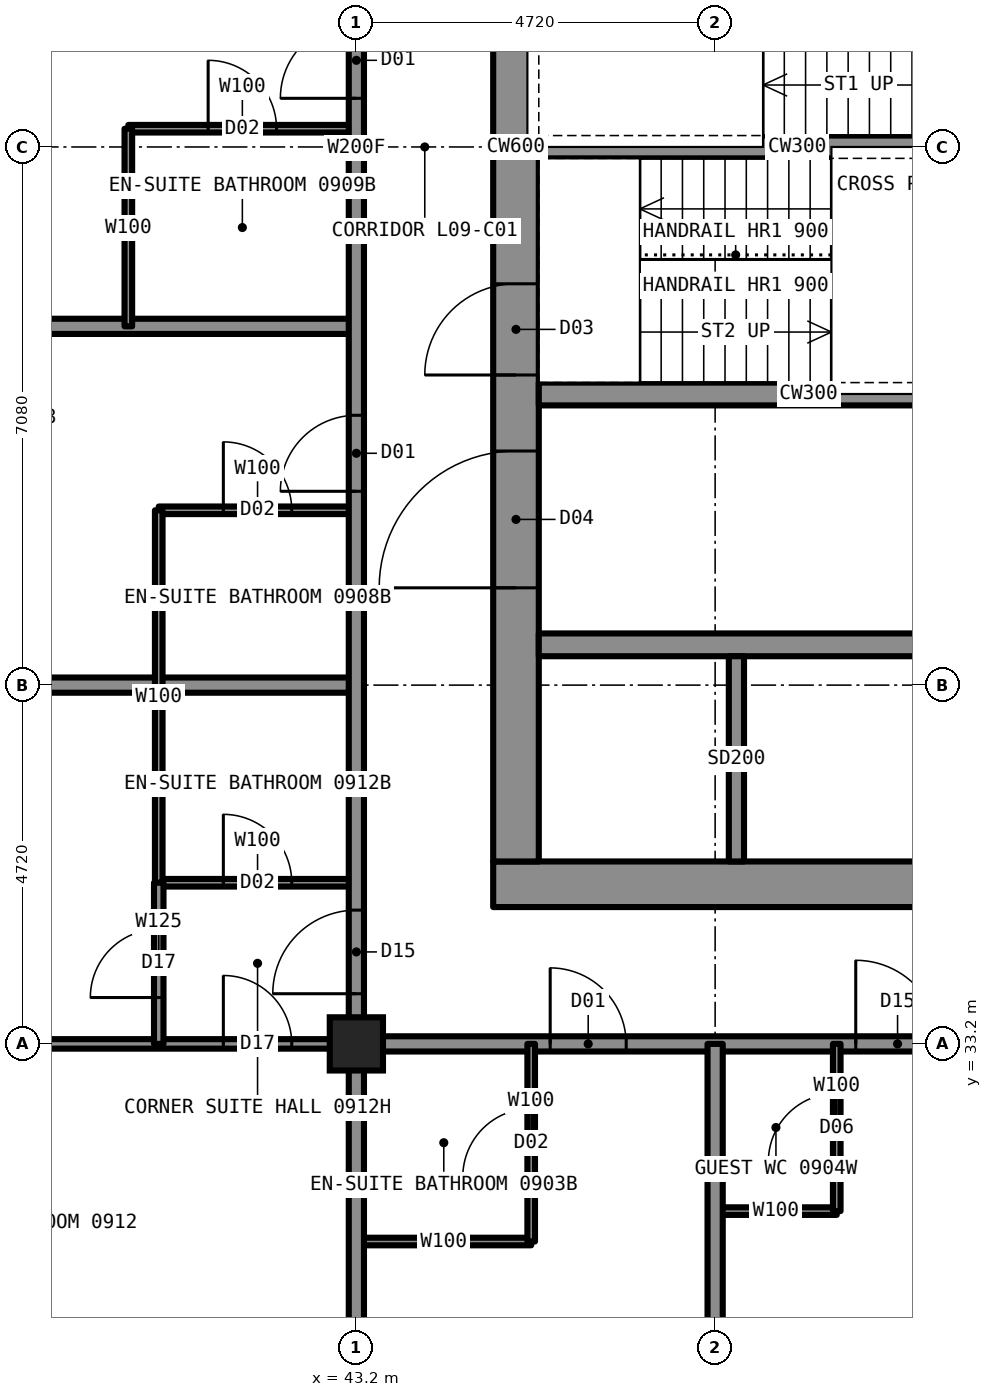
"""IFC4 building model, lengths in metres.
Left out: names, types, materials, properties, quantities, classifications, styles, units other than length and angle.
Written with IfcOpenShell. Run it as: python <this file> out.ifc"""

import sys

from ifc_helpers import new_model, si_unit, direction, frame, frame_2d, origin, origin_2d, place, context, subcontext, project, spatial, rectangle, hollow_rectangle, extrude, element, fill, save


model = new_model("IFC4")
c1 = context("Model", 3, precision=1e-05, world=origin(), true_north=direction((0.0, 1.0)))
c2 = subcontext(c1, "Body", "Model", "MODEL_VIEW")
j1 = project(units=[si_unit("LENGTHUNIT", "METRE"), si_unit("PLANEANGLEUNIT", "RADIAN")], contexts=[c1])
p1 = place(None, origin())
s1 = spatial("IfcSite", under=j1, at=p1, CompositionType="ELEMENT")
p2 = place(p1, origin())
s2 = spatial("IfcBuilding", under=s1, at=p2, CompositionType="ELEMENT")
p3 = place(p2, frame((0.0, 0.0, 39.0)))
s3 = spatial("IfcBuildingStorey", under=s2, at=p3, CompositionType="ELEMENT", Elevation=39.0)
p4 = place(p3, frame((43.2, 33.2, 0.0), z_axis=(0.0, 0.0, 1.0), x_axis=(1.0, 0.0, 0.0)))
e1 = element("IfcColumn", 1, at=p4, inside=s3, PredefinedType="COLUMN", context=c2, shape_type="SweptSolid", body=[
    extrude(hollow_rectangle(XDim=0.7, YDim=0.7, WallThickness=0.06, at=origin_2d()), origin(), (0.0, 0.0, 1.0), 3.5),
])
p5 = place(p3, frame((45.0, 35.3, 0.0), z_axis=(0.0, 0.0, 1.0), x_axis=(1.0, 0.0, 0.0)))
e2 = element("IfcWall", 2, at=p5, inside=s3, PredefinedType="SHEAR", context=c2, shape_type="SweptSolid", body=[
    extrude(rectangle(XDim=20.0, YDim=0.6, at=frame_2d((10.0, 0.0))), origin(), (0.0, 0.0, 1.0), 3.5),
])
p6 = place(p3, frame((45.3, 35.6, 0.0), z_axis=(0.0, 0.0, 1.0), x_axis=(0.0, 1.0, 0.0)))
e3 = element("IfcWall", 3, at=p6, inside=s3, PredefinedType="SHEAR", context=c2, shape_type="SweptSolid", body=[
    extrude(rectangle(XDim=18.8, YDim=0.6, at=frame_2d((9.4, 0.0))), origin(), (0.0, 0.0, 1.0), 3.5),
])
p7 = place(p6, frame((13.4, 0.0, 0.0)))
e4 = element("IfcOpeningElement", 4, at=p7, cuts=e3, PredefinedType="OPENING", context=c2, shape_type="SweptSolid", body=[
    extrude(rectangle(XDim=1.8, YDim=2.2, at=frame_2d((0.9, 1.1))), frame((0.0, 0.31, 0.0), z_axis=(0.0, -1.0, 0.0), x_axis=(1.0, 0.0, 0.0)), (0.0, 0.0, 1.0), 0.62),
])
p8 = place(p6, frame((3.6, 0.0, 0.0)))
e5 = element("IfcOpeningElement", 5, at=p8, cuts=e3, PredefinedType="OPENING", context=c2, shape_type="SweptSolid", body=[
    extrude(rectangle(XDim=1.8, YDim=2.2, at=frame_2d((0.9, 1.1))), frame((0.0, 0.31, 0.0), z_axis=(0.0, -1.0, 0.0), x_axis=(1.0, 0.0, 0.0)), (0.0, 0.0, 1.0), 0.62),
])
p9 = place(p6, frame((6.4, 0.0, 0.0)))
e6 = element("IfcOpeningElement", 6, at=p9, cuts=e3, PredefinedType="OPENING", context=c2, shape_type="SweptSolid", body=[
    extrude(rectangle(XDim=1.2, YDim=2.2, at=frame_2d((0.6, 1.1))), frame((0.0, 0.31, 0.0), z_axis=(0.0, -1.0, 0.0), x_axis=(1.0, 0.0, 0.0)), (0.0, 0.0, 1.0), 0.62),
])
p10 = place(p3, frame((45.6, 38.45, 0.0), z_axis=(0.0, 0.0, 1.0), x_axis=(1.0, 0.0, 0.0)))
e7 = element("IfcWall", 7, at=p10, inside=s3, PredefinedType="SHEAR", context=c2, shape_type="SweptSolid", body=[
    extrude(rectangle(XDim=18.8, YDim=0.3, at=frame_2d((9.4, 0.0))), origin(), (0.0, 0.0, 1.0), 3.5),
])
p11 = place(p3, frame((45.6, 41.75, 0.0), z_axis=(0.0, 0.0, 1.0), x_axis=(1.0, 0.0, 0.0)))
e8 = element("IfcWall", 8, at=p11, inside=s3, PredefinedType="SHEAR", context=c2, shape_type="SweptSolid", body=[
    extrude(rectangle(XDim=7.1, YDim=0.3, at=frame_2d((3.55, 0.0))), origin(), (0.0, 0.0, 1.0), 3.5),
])
p12 = place(p3, frame((45.6, 45.0, 0.0), z_axis=(0.0, 0.0, 1.0), x_axis=(1.0, 0.0, 0.0)))
e9 = element("IfcWall", 9, at=p12, inside=s3, PredefinedType="SHEAR", context=c2, shape_type="SweptSolid", body=[
    extrude(rectangle(XDim=6.8, YDim=0.3, at=frame_2d((3.4, 0.0))), origin(), (0.0, 0.0, 1.0), 3.5),
])
p13 = place(p3, frame((43.2, 33.2, 0.0), z_axis=(0.0, 0.0, 1.0), x_axis=(1.0, 0.0, 0.0)))
e10 = element("IfcWall", 10, at=p13, inside=s3, PredefinedType="PARTITIONING", context=c2, shape_type="SweptSolid", body=[
    extrude(rectangle(XDim=23.6, YDim=0.2, at=frame_2d((11.8, 0.0))), origin(), (0.0, 0.0, 1.0), 3.33),
])
p14 = place(p13, frame((2.55, 0.0, 0.0)))
e11 = element("IfcOpeningElement", 11, at=p14, cuts=e10, PredefinedType="OPENING", context=c2, shape_type="SweptSolid", body=[
    extrude(rectangle(XDim=1.0, YDim=2.2, at=frame_2d((0.5, 1.1))), frame((0.0, 0.11, 0.0), z_axis=(0.0, -1.0, 0.0), x_axis=(1.0, 0.0, 0.0)), (0.0, 0.0, 1.0), 0.22),
])
p15 = place(p13, frame((6.57, 0.0, 0.0)))
e12 = element("IfcOpeningElement", 12, at=p15, cuts=e10, PredefinedType="OPENING", context=c2, shape_type="SweptSolid", body=[
    extrude(rectangle(XDim=1.1, YDim=2.2, at=frame_2d((0.55, 1.1))), frame((0.0, 0.11, 0.0), z_axis=(0.0, -1.0, 0.0), x_axis=(1.0, 0.0, 0.0)), (0.0, 0.0, 1.0), 0.22),
])
p16 = place(p13, frame((20.34, 0.0, 0.0)))
e13 = element("IfcOpeningElement", 13, at=p16, cuts=e10, PredefinedType="OPENING", context=c2, shape_type="SweptSolid", body=[
    extrude(rectangle(XDim=1.0, YDim=2.2, at=frame_2d((0.5, 1.1))), frame((0.0, 0.11, 0.0), z_axis=(0.0, -1.0, 0.0), x_axis=(1.0, 0.0, 0.0)), (0.0, 0.0, 1.0), 0.22),
])
p17 = place(p3, frame((33.3, 33.2, 0.0), z_axis=(0.0, 0.0, 1.0), x_axis=(1.0, 0.0, 0.0)))
e14 = element("IfcWall", 14, at=p17, inside=s3, PredefinedType="PARTITIONING", context=c2, shape_type="SweptSolid", body=[
    extrude(rectangle(XDim=9.9, YDim=0.125, at=frame_2d((4.95, 0.0))), origin(), (0.0, 0.0, 1.0), 2.573),
])
p18 = place(p17, frame((8.15, 0.0, 0.0)))
e15 = element("IfcOpeningElement", 15, at=p18, cuts=e14, PredefinedType="OPENING", context=c2, shape_type="SweptSolid", body=[
    extrude(rectangle(XDim=0.9, YDim=2.2, at=frame_2d((0.45, 1.1))), frame((0.0, 0.073, 0.0), z_axis=(0.0, -1.0, 0.0), x_axis=(1.0, 0.0, 0.0)), (0.0, 0.0, 1.0), 0.145),
])
p19 = place(p3, frame((47.92, 31.0, 0.0), z_axis=(0.0, 0.0, 1.0), x_axis=(1.0, 0.0, 0.0)))
e16 = element("IfcWall", 16, at=p19, inside=s3, PredefinedType="PARTITIONING", context=c2, shape_type="SweptSolid", body=[
    extrude(rectangle(XDim=1.6, YDim=0.1, at=frame_2d((0.8, 0.0))), origin(), (0.0, 0.0, 1.0), 3.33),
])
p20 = place(p3, frame((43.2, 30.6, 0.0), z_axis=(0.0, 0.0, 1.0), x_axis=(1.0, 0.0, 0.0)))
e17 = element("IfcWall", 17, at=p20, inside=s3, PredefinedType="PARTITIONING", context=c2, shape_type="SweptSolid", body=[
    extrude(rectangle(XDim=2.3, YDim=0.1, at=frame_2d((1.15, 0.0))), origin(), (0.0, 0.0, 1.0), 3.33),
])
p21 = place(p3, frame((33.3, 42.64, 0.0), z_axis=(0.0, 0.0, 1.0), x_axis=(1.0, 0.0, 0.0)))
e18 = element("IfcWall", 18, at=p21, inside=s3, PredefinedType="PARTITIONING", context=c2, shape_type="SweptSolid", body=[
    extrude(rectangle(XDim=9.9, YDim=0.2, at=frame_2d((4.95, 0.0))), origin(), (0.0, 0.0, 1.0), 2.723),
])
p22 = place(p3, frame((40.6, 40.22, 0.0), z_axis=(0.0, 0.0, 1.0), x_axis=(1.0, 0.0, 0.0)))
e19 = element("IfcWall", 19, at=p22, inside=s3, PredefinedType="PARTITIONING", context=c2, shape_type="SweptSolid", body=[
    extrude(rectangle(XDim=2.6, YDim=0.1, at=frame_2d((1.3, 0.0))), origin(), (0.0, 0.0, 1.0), 2.723),
])
p23 = place(p22, frame((0.85, 0.0, 0.0)))
e20 = element("IfcOpeningElement", 20, at=p23, cuts=e19, PredefinedType="OPENING", context=c2, shape_type="SweptSolid", body=[
    extrude(rectangle(XDim=0.9, YDim=2.1, at=frame_2d((0.45, 1.05))), frame((0.0, 0.06, 0.0), z_axis=(0.0, -1.0, 0.0), x_axis=(1.0, 0.0, 0.0)), (0.0, 0.0, 1.0), 0.12),
])
p24 = place(p3, frame((33.3, 37.92, 0.0), z_axis=(0.0, 0.0, 1.0), x_axis=(1.0, 0.0, 0.0)))
e21 = element("IfcWall", 21, at=p24, inside=s3, PredefinedType="PARTITIONING", context=c2, shape_type="SweptSolid", body=[
    extrude(rectangle(XDim=9.9, YDim=0.2, at=frame_2d((4.95, 0.0))), origin(), (0.0, 0.0, 1.0), 2.573),
])
p25 = place(p3, frame((40.6, 35.32, 0.0), z_axis=(0.0, 0.0, 1.0), x_axis=(1.0, 0.0, 0.0)))
e22 = element("IfcWall", 22, at=p25, inside=s3, PredefinedType="PARTITIONING", context=c2, shape_type="SweptSolid", body=[
    extrude(rectangle(XDim=2.6, YDim=0.1, at=frame_2d((1.3, 0.0))), origin(), (0.0, 0.0, 1.0), 3.33),
])
p26 = place(p25, frame((0.85, 0.0, 0.0)))
e23 = element("IfcOpeningElement", 23, at=p26, cuts=e22, PredefinedType="OPENING", context=c2, shape_type="SweptSolid", body=[
    extrude(rectangle(XDim=0.9, YDim=2.1, at=frame_2d((0.45, 1.05))), frame((0.0, 0.06, 0.0), z_axis=(0.0, -1.0, 0.0), x_axis=(1.0, 0.0, 0.0)), (0.0, 0.0, 1.0), 0.12),
])
p27 = place(p3, frame((40.2, 45.24, 0.0), z_axis=(0.0, 0.0, 1.0), x_axis=(1.0, 0.0, 0.0)))
e24 = element("IfcWall", 24, at=p27, inside=s3, PredefinedType="PARTITIONING", context=c2, shape_type="SweptSolid", body=[
    extrude(rectangle(XDim=3.0, YDim=0.1, at=frame_2d((1.5, 0.0))), origin(), (0.0, 0.0, 1.0), 3.33),
])
p28 = place(p27, frame((1.05, 0.0, 0.0)))
e25 = element("IfcOpeningElement", 25, at=p28, cuts=e24, PredefinedType="OPENING", context=c2, shape_type="SweptSolid", body=[
    extrude(rectangle(XDim=0.9, YDim=2.1, at=frame_2d((0.45, 1.05))), frame((0.0, 0.06, 0.0), z_axis=(0.0, -1.0, 0.0), x_axis=(1.0, 0.0, 0.0)), (0.0, 0.0, 1.0), 0.12),
])
p29 = place(p3, frame((43.2, 33.2, 0.0), z_axis=(0.0, 0.0, 1.0), x_axis=(0.0, 1.0, 0.0)))
e26 = element("IfcWall", 26, at=p29, inside=s3, PredefinedType="PARTITIONING", context=c2, shape_type="SweptSolid", body=[
    extrude(rectangle(XDim=23.58, YDim=0.2, at=frame_2d((11.79, 0.0))), origin(), (0.0, 0.0, 1.0), 3.33),
])
p30 = place(p29, frame((7.27, 0.0, 0.0)))
e27 = element("IfcOpeningElement", 27, at=p30, cuts=e26, PredefinedType="OPENING", context=c2, shape_type="SweptSolid", body=[
    extrude(rectangle(XDim=1.0, YDim=2.2, at=frame_2d((0.5, 1.1))), frame((0.0, 0.11, 0.0), z_axis=(0.0, -1.0, 0.0), x_axis=(1.0, 0.0, 0.0)), (0.0, 0.0, 1.0), 0.22),
])
p31 = place(p29, frame((12.44, 0.0, 0.0)))
e28 = element("IfcOpeningElement", 28, at=p31, cuts=e26, PredefinedType="OPENING", context=c2, shape_type="SweptSolid", body=[
    extrude(rectangle(XDim=1.0, YDim=2.2, at=frame_2d((0.5, 1.1))), frame((0.0, 0.11, 0.0), z_axis=(0.0, -1.0, 0.0), x_axis=(1.0, 0.0, 0.0)), (0.0, 0.0, 1.0), 0.22),
])
p32 = place(p29, frame((21.84, 0.0, 0.0)))
e29 = element("IfcOpeningElement", 29, at=p32, cuts=e26, PredefinedType="OPENING", context=c2, shape_type="SweptSolid", body=[
    extrude(rectangle(XDim=1.1, YDim=2.2, at=frame_2d((0.55, 1.1))), frame((0.0, 0.11, 0.0), z_axis=(0.0, -1.0, 0.0), x_axis=(1.0, 0.0, 0.0)), (0.0, 0.0, 1.0), 0.22),
])
p33 = place(p29, frame((0.66, 0.0, 0.0)))
e30 = element("IfcOpeningElement", 30, at=p33, cuts=e26, PredefinedType="OPENING", context=c2, shape_type="SweptSolid", body=[
    extrude(rectangle(XDim=1.1, YDim=2.2, at=frame_2d((0.55, 1.1))), frame((0.0, 0.11, 0.0), z_axis=(0.0, -1.0, 0.0), x_axis=(1.0, 0.0, 0.0)), (0.0, 0.0, 1.0), 0.22),
])
p34 = place(p3, frame((43.2, 23.3, 0.0), z_axis=(0.0, 0.0, 1.0), x_axis=(0.0, 1.0, 0.0)))
e31 = element("IfcWall", 31, at=p34, inside=s3, PredefinedType="PARTITIONING", context=c2, shape_type="SweptSolid", body=[
    extrude(rectangle(XDim=9.9, YDim=0.2, at=frame_2d((4.95, 0.0))), origin(), (0.0, 0.0, 1.0), 2.573),
])
p35 = place(p3, frame((40.6, 35.32, 0.0), z_axis=(0.0, 0.0, 1.0), x_axis=(0.0, 1.0, 0.0)))
e32 = element("IfcWall", 32, at=p35, inside=s3, PredefinedType="PARTITIONING", context=c2, shape_type="SweptSolid", body=[
    extrude(rectangle(XDim=4.9, YDim=0.1, at=frame_2d((2.45, 0.0))), origin(), (0.0, 0.0, 1.0), 3.33),
])
p36 = place(p3, frame((40.6, 33.2, 0.0), z_axis=(0.0, 0.0, 1.0), x_axis=(0.0, 1.0, 0.0)))
e33 = element("IfcWall", 33, at=p36, inside=s3, PredefinedType="PARTITIONING", context=c2, shape_type="SweptSolid", body=[
    extrude(rectangle(XDim=2.12, YDim=0.125, at=frame_2d((1.06, 0.0))), origin(), (0.0, 0.0, 1.0), 3.33),
])
p37 = place(p36, frame((0.61, 0.0, 0.0)))
e34 = element("IfcOpeningElement", 34, at=p37, cuts=e33, PredefinedType="OPENING", context=c2, shape_type="SweptSolid", body=[
    extrude(rectangle(XDim=0.9, YDim=2.2, at=frame_2d((0.45, 1.1))), frame((0.0, 0.073, 0.0), z_axis=(0.0, -1.0, 0.0), x_axis=(1.0, 0.0, 0.0)), (0.0, 0.0, 1.0), 0.145),
])
p38 = place(p3, frame((40.2, 42.64, 0.0), z_axis=(0.0, 0.0, 1.0), x_axis=(0.0, 1.0, 0.0)))
e35 = element("IfcWall", 35, at=p38, inside=s3, PredefinedType="PARTITIONING", context=c2, shape_type="SweptSolid", body=[
    extrude(rectangle(XDim=2.6, YDim=0.1, at=frame_2d((1.3, 0.0))), origin(), (0.0, 0.0, 1.0), 3.33),
])
p39 = place(p3, frame((49.52, 31.0, 0.0), z_axis=(0.0, 0.0, 1.0), x_axis=(0.0, 1.0, 0.0)))
e36 = element("IfcWall", 36, at=p39, inside=s3, PredefinedType="PARTITIONING", context=c2, shape_type="SweptSolid", body=[
    extrude(rectangle(XDim=2.2, YDim=0.1, at=frame_2d((1.1, 0.0))), origin(), (0.0, 0.0, 1.0), 3.33),
])
p40 = place(p39, frame((0.65, 0.0, 0.0)))
e37 = element("IfcOpeningElement", 37, at=p40, cuts=e36, PredefinedType="OPENING", context=c2, shape_type="SweptSolid", body=[
    extrude(rectangle(XDim=0.9, YDim=2.1, at=frame_2d((0.45, 1.05))), frame((0.0, 0.06, 0.0), z_axis=(0.0, -1.0, 0.0), x_axis=(1.0, 0.0, 0.0)), (0.0, 0.0, 1.0), 0.12),
])
p41 = place(p3, frame((47.92, 23.3, 0.0), z_axis=(0.0, 0.0, 1.0), x_axis=(0.0, 1.0, 0.0)))
e38 = element("IfcWall", 38, at=p41, inside=s3, PredefinedType="PARTITIONING", context=c2, shape_type="SweptSolid", body=[
    extrude(rectangle(XDim=9.9, YDim=0.2, at=frame_2d((4.95, 0.0))), origin(), (0.0, 0.0, 1.0), 2.573),
])
p42 = place(p3, frame((45.5, 30.6, 0.0), z_axis=(0.0, 0.0, 1.0), x_axis=(0.0, 1.0, 0.0)))
e39 = element("IfcWall", 39, at=p42, inside=s3, PredefinedType="PARTITIONING", context=c2, shape_type="SweptSolid", body=[
    extrude(rectangle(XDim=2.6, YDim=0.1, at=frame_2d((1.3, 0.0))), origin(), (0.0, 0.0, 1.0), 3.33),
])
p43 = place(p42, frame((0.85, 0.0, 0.0)))
e40 = element("IfcOpeningElement", 40, at=p43, cuts=e39, PredefinedType="OPENING", context=c2, shape_type="SweptSolid", body=[
    extrude(rectangle(XDim=0.9, YDim=2.1, at=frame_2d((0.45, 1.05))), frame((0.0, 0.06, 0.0), z_axis=(0.0, -1.0, 0.0), x_axis=(1.0, 0.0, 0.0)), (0.0, 0.0, 1.0), 0.12),
])
p44 = place(p3, frame((48.2, 35.6, 0.0), z_axis=(0.0, 0.0, 1.0), x_axis=(0.0, 1.0, 0.0)))
e41 = element("IfcWall", 41, at=p44, inside=s3, PredefinedType="PARTITIONING", context=c2, shape_type="SweptSolid", body=[
    extrude(rectangle(XDim=2.7, YDim=0.2, at=frame_2d((1.35, 0.0))), origin(), (0.0, 0.0, 1.0), 3.33),
])
p45 = place(p14, origin())
e42 = element("IfcDoor", 42, at=p45, inside=s3, OperationType="SINGLE_SWING_LEFT", PredefinedType="DOOR", context=c2, shape_type="SweptSolid", body=[
    extrude(rectangle(XDim=1.0, YDim=2.2, at=frame_2d((0.5, 1.1))), frame((0.0, 0.025, 0.0), z_axis=(0.0, -1.0, 0.0), x_axis=(1.0, 0.0, 0.0)), (0.0, 0.0, 1.0), 0.05),
])
fill(e11, e42)
p46 = place(p43, origin())
e43 = element("IfcDoor", 43, at=p46, inside=s3, OperationType="SINGLE_SWING_RIGHT", PredefinedType="DOOR", context=c2, shape_type="SweptSolid", body=[
    extrude(rectangle(XDim=0.9, YDim=2.1, at=frame_2d((0.45, 1.05))), frame((0.0, 0.025, 0.0), z_axis=(0.0, -1.0, 0.0), x_axis=(1.0, 0.0, 0.0)), (0.0, 0.0, 1.0), 0.05),
])
fill(e40, e43)
p47 = place(p15, origin())
e44 = element("IfcDoor", 44, at=p47, inside=s3, OperationType="SINGLE_SWING_LEFT", PredefinedType="DOOR", context=c2, shape_type="SweptSolid", body=[
    extrude(rectangle(XDim=1.1, YDim=2.2, at=frame_2d((0.55, 1.1))), frame((0.0, 0.025, 0.0), z_axis=(0.0, -1.0, 0.0), x_axis=(1.0, 0.0, 0.0)), (0.0, 0.0, 1.0), 0.05),
])
fill(e12, e44)
p48 = place(p40, origin())
e45 = element("IfcDoor", 45, at=p48, inside=s3, OperationType="SINGLE_SWING_LEFT", PredefinedType="DOOR", context=c2, shape_type="SweptSolid", body=[
    extrude(rectangle(XDim=0.9, YDim=2.1, at=frame_2d((0.45, 1.05))), frame((0.0, 0.025, 0.0), z_axis=(0.0, -1.0, 0.0), x_axis=(1.0, 0.0, 0.0)), (0.0, 0.0, 1.0), 0.05),
])
fill(e37, e45)
p49 = place(p30, origin())
e46 = element("IfcDoor", 46, at=p49, inside=s3, OperationType="SINGLE_SWING_LEFT", PredefinedType="DOOR", context=c2, shape_type="SweptSolid", body=[
    extrude(rectangle(XDim=1.0, YDim=2.2, at=frame_2d((0.5, 1.1))), frame((0.0, 0.025, 0.0), z_axis=(0.0, -1.0, 0.0), x_axis=(1.0, 0.0, 0.0)), (0.0, 0.0, 1.0), 0.05),
])
fill(e27, e46)
p50 = place(p23, origin())
e47 = element("IfcDoor", 47, at=p50, inside=s3, OperationType="SINGLE_SWING_RIGHT", PredefinedType="DOOR", context=c2, shape_type="SweptSolid", body=[
    extrude(rectangle(XDim=0.9, YDim=2.1, at=frame_2d((0.45, 1.05))), frame((0.0, 0.025, 0.0), z_axis=(0.0, -1.0, 0.0), x_axis=(1.0, 0.0, 0.0)), (0.0, 0.0, 1.0), 0.05),
])
fill(e20, e47)
p51 = place(p31, origin())
e48 = element("IfcDoor", 48, at=p51, inside=s3, OperationType="SINGLE_SWING_LEFT", PredefinedType="DOOR", context=c2, shape_type="SweptSolid", body=[
    extrude(rectangle(XDim=1.0, YDim=2.2, at=frame_2d((0.5, 1.1))), frame((0.0, 0.025, 0.0), z_axis=(0.0, -1.0, 0.0), x_axis=(1.0, 0.0, 0.0)), (0.0, 0.0, 1.0), 0.05),
])
fill(e28, e48)
p52 = place(p28, origin())
e49 = element("IfcDoor", 49, at=p52, inside=s3, OperationType="SINGLE_SWING_RIGHT", PredefinedType="DOOR", context=c2, shape_type="SweptSolid", body=[
    extrude(rectangle(XDim=0.9, YDim=2.1, at=frame_2d((0.45, 1.05))), frame((0.0, 0.025, 0.0), z_axis=(0.0, -1.0, 0.0), x_axis=(1.0, 0.0, 0.0)), (0.0, 0.0, 1.0), 0.05),
])
fill(e25, e49)
p53 = place(p18, origin())
e50 = element("IfcDoor", 50, at=p53, inside=s3, OperationType="SINGLE_SWING_LEFT", PredefinedType="DOOR", context=c2, shape_type="SweptSolid", body=[
    extrude(rectangle(XDim=0.9, YDim=2.2, at=frame_2d((0.45, 1.1))), frame((0.0, 0.025, 0.0), z_axis=(0.0, -1.0, 0.0), x_axis=(1.0, 0.0, 0.0)), (0.0, 0.0, 1.0), 0.05),
])
fill(e15, e50)
p54 = place(p26, origin())
e51 = element("IfcDoor", 51, at=p54, inside=s3, OperationType="SINGLE_SWING_RIGHT", PredefinedType="DOOR", context=c2, shape_type="SweptSolid", body=[
    extrude(rectangle(XDim=0.9, YDim=2.1, at=frame_2d((0.45, 1.05))), frame((0.0, 0.025, 0.0), z_axis=(0.0, -1.0, 0.0), x_axis=(1.0, 0.0, 0.0)), (0.0, 0.0, 1.0), 0.05),
])
fill(e23, e51)
p55 = place(p33, origin())
e52 = element("IfcDoor", 52, at=p55, inside=s3, OperationType="SINGLE_SWING_LEFT", PredefinedType="DOOR", context=c2, shape_type="SweptSolid", body=[
    extrude(rectangle(XDim=1.1, YDim=2.2, at=frame_2d((0.55, 1.1))), frame((0.0, 0.025, 0.0), z_axis=(0.0, -1.0, 0.0), x_axis=(1.0, 0.0, 0.0)), (0.0, 0.0, 1.0), 0.05),
])
fill(e30, e52)
p56 = place(p37, origin())
e53 = element("IfcDoor", 53, at=p56, inside=s3, OperationType="SINGLE_SWING_LEFT", PredefinedType="DOOR", context=c2, shape_type="SweptSolid", body=[
    extrude(rectangle(XDim=0.9, YDim=2.2, at=frame_2d((0.45, 1.1))), frame((0.0, 0.025, 0.0), z_axis=(0.0, -1.0, 0.0), x_axis=(1.0, 0.0, 0.0)), (0.0, 0.0, 1.0), 0.05),
])
fill(e34, e53)
p57 = place(p8, origin())
e54 = element("IfcDoor", 54, at=p57, inside=s3, OperationType="DOUBLE_DOOR_SINGLE_SWING", PredefinedType="DOOR", context=c2, shape_type="SweptSolid", body=[
    extrude(rectangle(XDim=1.8, YDim=2.2, at=frame_2d((0.9, 1.1))), frame((0.0, 0.025, 0.0), z_axis=(0.0, -1.0, 0.0), x_axis=(1.0, 0.0, 0.0)), (0.0, 0.0, 1.0), 0.05),
])
fill(e5, e54)
p58 = place(p9, origin())
e55 = element("IfcDoor", 55, at=p58, inside=s3, OperationType="SINGLE_SWING_LEFT", PredefinedType="DOOR", context=c2, shape_type="SweptSolid", body=[
    extrude(rectangle(XDim=1.2, YDim=2.2, at=frame_2d((0.6, 1.1))), frame((0.0, 0.025, 0.0), z_axis=(0.0, -1.0, 0.0), x_axis=(1.0, 0.0, 0.0)), (0.0, 0.0, 1.0), 0.05),
])
fill(e6, e55)
save(model, sys.argv[1])
